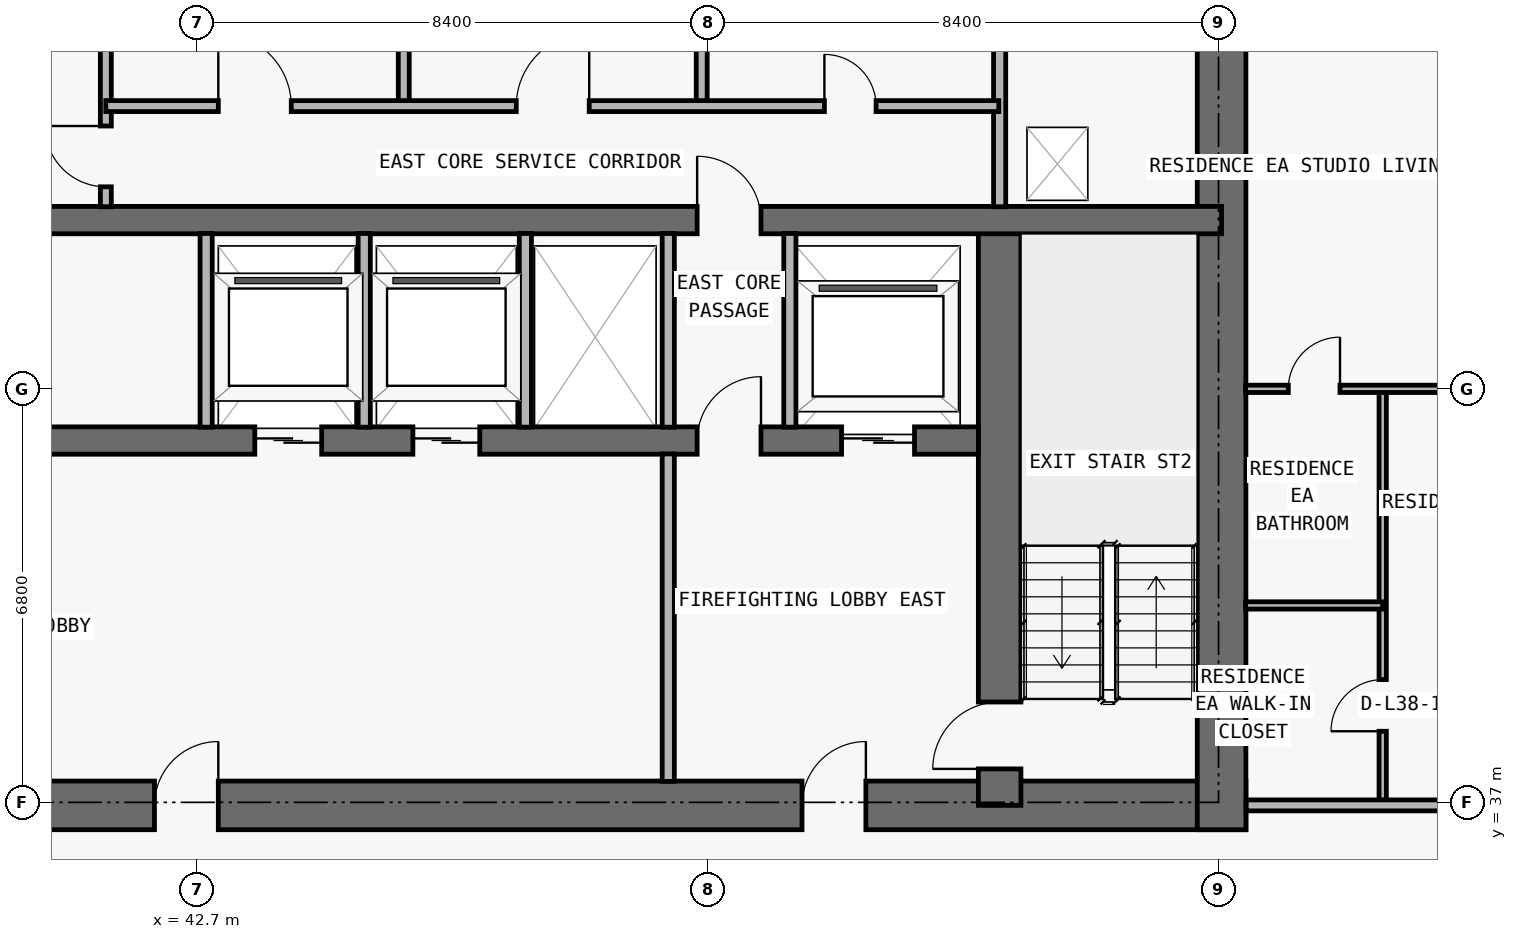
"""IFC4 building model, lengths in metres.
Left out: names, types, materials, properties, quantities, classifications, styles, units other than length and angle.
Written with IfcOpenShell. Run it as: python <this file> out.ifc"""

import sys

from ifc_helpers import new_model, si_unit, direction, frame, frame_2d, origin, place, context, subcontext, project, spatial, rectangle, extrude, element, fill, save


model = new_model("IFC4")
c1 = context("Model", 3, precision=1e-05, world=origin(), true_north=direction((0.0, 1.0)))
c2 = subcontext(c1, "Body", "Model", "MODEL_VIEW")
j1 = project(units=[si_unit("LENGTHUNIT", "METRE"), si_unit("PLANEANGLEUNIT", "RADIAN")], contexts=[c1])
p1 = place(None, origin())
s1 = spatial("IfcSite", under=j1, at=p1, CompositionType="ELEMENT")
p2 = place(p1, origin())
s2 = spatial("IfcBuilding", under=s1, at=p2, CompositionType="ELEMENT")
p3 = place(p2, frame((0.0, 0.0, 138.9)))
s3 = spatial("IfcBuildingStorey", under=s2, at=p3, CompositionType="ELEMENT", Elevation=138.9)
p4 = place(p3, frame((17.85, 36.95, 0.0), z_axis=(0.0, 0.0, 1.0), x_axis=(1.0, 0.0, 0.0)))
e1 = element("IfcWall", 1, at=p4, inside=s3, PredefinedType="SHEAR", context=c2, shape_type="SweptSolid", body=[
    extrude(rectangle(XDim=42.1, YDim=0.8, at=frame_2d((21.05, 0.0))), origin(), (0.0, 0.0, 1.0), 3.05),
])
p5 = place(p4, frame((14.45, 0.0, 0.0)))
e2 = element("IfcOpeningElement", 2, at=p5, cuts=e1, PredefinedType="OPENING", context=c2, shape_type="SweptSolid", body=[
    extrude(rectangle(XDim=1.1, YDim=2.15, at=frame_2d((0.55, 1.075))), frame((0.0, 0.41, 0.0), z_axis=(0.0, -1.0, 0.0), x_axis=(1.0, 0.0, 0.0)), (0.0, 0.0, 1.0), 0.82),
])
p6 = place(p4, frame((6.3, 0.0, 0.0)))
e3 = element("IfcOpeningElement", 3, at=p6, cuts=e1, PredefinedType="OPENING", context=c2, shape_type="SweptSolid", body=[
    extrude(rectangle(XDim=1.05, YDim=2.15, at=frame_2d((0.525, 1.075))), frame((0.0, 0.41, 0.0), z_axis=(0.0, -1.0, 0.0), x_axis=(1.0, 0.0, 0.0)), (0.0, 0.0, 1.0), 0.82),
])
p7 = place(p4, frame((34.8, 0.0, 0.0)))
e4 = element("IfcOpeningElement", 4, at=p7, cuts=e1, PredefinedType="OPENING", context=c2, shape_type="SweptSolid", body=[
    extrude(rectangle(XDim=1.05, YDim=2.15, at=frame_2d((0.525, 1.075))), frame((0.0, 0.41, 0.0), z_axis=(0.0, -1.0, 0.0), x_axis=(1.0, 0.0, 0.0)), (0.0, 0.0, 1.0), 0.82),
])
p8 = place(p4, frame((10.913, 0.0, 0.0)))
e5 = element("IfcOpeningElement", 5, at=p8, cuts=e1, PredefinedType="OPENING", context=c2, shape_type="SweptSolid", body=[
    extrude(rectangle(XDim=1.05, YDim=2.15, at=frame_2d((0.525, 1.075))), frame((0.0, 0.41, 0.0), z_axis=(0.0, -1.0, 0.0), x_axis=(1.0, 0.0, 0.0)), (0.0, 0.0, 1.0), 0.82),
])
p9 = place(p4, frame((24.15, 0.0, 0.0)))
e6 = element("IfcOpeningElement", 6, at=p9, cuts=e1, PredefinedType="OPENING", context=c2, shape_type="SweptSolid", body=[
    extrude(rectangle(XDim=1.05, YDim=2.15, at=frame_2d((0.525, 1.075))), frame((0.0, 0.41, 0.0), z_axis=(0.0, -1.0, 0.0), x_axis=(1.0, 0.0, 0.0)), (0.0, 0.0, 1.0), 0.82),
])
p10 = place(p3, frame((59.55, 36.55, 0.0), z_axis=(0.0, 0.0, 1.0), x_axis=(0.0, 1.0, 0.0)))
e7 = element("IfcWall", 7, at=p10, inside=s3, PredefinedType="SHEAR", context=c2, shape_type="SweptSolid", body=[
    extrude(rectangle(XDim=14.05, YDim=0.8, at=frame_2d((7.025, 0.0))), origin(), (0.0, 0.0, 1.0), 3.05),
])
p11 = place(p3, frame((55.9, 36.95, 0.0), z_axis=(0.0, 0.0, 1.0), x_axis=(0.0, 1.0, 0.0)))
e8 = element("IfcWall", 8, at=p11, inside=s3, PredefinedType="SHEAR", context=c2, shape_type="SweptSolid", body=[
    extrude(rectangle(XDim=9.625, YDim=0.7, at=frame_2d((4.812, 0.0))), origin(), (0.0, 0.0, 1.0), 3.05),
])
p12 = place(p11, frame((0.6, 0.0, 0.0)))
e9 = element("IfcOpeningElement", 9, at=p12, cuts=e8, PredefinedType="OPENING", context=c2, shape_type="SweptSolid", body=[
    extrude(rectangle(XDim=1.1, YDim=2.15, at=frame_2d((0.55, 1.075))), frame((0.0, 0.36, 0.0), z_axis=(0.0, -1.0, 0.0), x_axis=(1.0, 0.0, 0.0)), (0.0, 0.0, 1.0), 0.72),
])
p13 = place(p3, frame((22.25, 42.95, 0.0), z_axis=(0.0, 0.0, 1.0), x_axis=(1.0, 0.0, 0.0)))
e10 = element("IfcWall", 10, at=p13, inside=s3, PredefinedType="SHEAR", context=c2, shape_type="SweptSolid", body=[
    extrude(rectangle(XDim=33.3, YDim=0.45, at=frame_2d((16.65, 0.0))), origin(), (0.0, 0.0, 1.0), 3.05),
])
p14 = place(p13, frame((1.05, 0.0, 0.0)))
e11 = element("IfcOpeningElement", 11, at=p14, cuts=e10, PredefinedType="OPENING", context=c2, shape_type="SweptSolid", body=[
    extrude(rectangle(XDim=1.2, YDim=2.2, at=frame_2d((0.6, 1.1))), frame((0.0, 0.235, 0.0), z_axis=(0.0, -1.0, 0.0), x_axis=(1.0, 0.0, 0.0)), (0.0, 0.0, 1.0), 0.47),
])
p15 = place(p13, frame((31.05, 0.0, 0.0)))
e12 = element("IfcOpeningElement", 12, at=p15, cuts=e10, PredefinedType="OPENING", context=c2, shape_type="SweptSolid", body=[
    extrude(rectangle(XDim=1.2, YDim=2.2, at=frame_2d((0.6, 1.1))), frame((0.0, 0.235, 0.0), z_axis=(0.0, -1.0, 0.0), x_axis=(1.0, 0.0, 0.0)), (0.0, 0.0, 1.0), 0.47),
])
p16 = place(p13, frame((21.4, 0.0, 0.0)))
e13 = element("IfcOpeningElement", 13, at=p16, cuts=e10, PredefinedType="OPENING", context=c2, shape_type="SweptSolid", body=[
    extrude(rectangle(XDim=1.1, YDim=2.2, at=frame_2d((0.55, 1.1))), frame((0.0, 0.235, 0.0), z_axis=(0.0, -1.0, 0.0), x_axis=(1.0, 0.0, 0.0)), (0.0, 0.0, 1.0), 0.47),
])
p17 = place(p13, frame((24.0, 0.0, 0.0)))
e14 = element("IfcOpeningElement", 14, at=p17, cuts=e10, PredefinedType="OPENING", context=c2, shape_type="SweptSolid", body=[
    extrude(rectangle(XDim=1.1, YDim=2.2, at=frame_2d((0.55, 1.1))), frame((0.0, 0.235, 0.0), z_axis=(0.0, -1.0, 0.0), x_axis=(1.0, 0.0, 0.0)), (0.0, 0.0, 1.0), 0.47),
])
p18 = place(p13, frame((3.625, 0.0, 0.0)))
e15 = element("IfcOpeningElement", 15, at=p18, cuts=e10, PredefinedType="OPENING", context=c2, shape_type="SweptSolid", body=[
    extrude(rectangle(XDim=1.05, YDim=2.15, at=frame_2d((0.525, 1.075))), frame((0.0, 0.235, 0.0), z_axis=(0.0, -1.0, 0.0), x_axis=(1.0, 0.0, 0.0)), (0.0, 0.0, 1.0), 0.47),
])
p19 = place(p13, frame((28.675, 0.0, 0.0)))
e16 = element("IfcOpeningElement", 16, at=p19, cuts=e10, PredefinedType="OPENING", context=c2, shape_type="SweptSolid", body=[
    extrude(rectangle(XDim=1.05, YDim=2.15, at=frame_2d((0.525, 1.075))), frame((0.0, 0.235, 0.0), z_axis=(0.0, -1.0, 0.0), x_axis=(1.0, 0.0, 0.0)), (0.0, 0.0, 1.0), 0.47),
])
p20 = place(p13, frame((15.975, 0.0, 0.0)))
e17 = element("IfcOpeningElement", 17, at=p20, cuts=e10, PredefinedType="OPENING", context=c2, shape_type="SweptSolid", body=[
    extrude(rectangle(XDim=1.0, YDim=2.2, at=frame_2d((0.5, 1.1))), frame((0.0, 0.235, 0.0), z_axis=(0.0, -1.0, 0.0), x_axis=(1.0, 0.0, 0.0)), (0.0, 0.0, 1.0), 0.47),
])
p21 = place(p3, frame((18.25, 46.575, 0.0), z_axis=(0.0, 0.0, 1.0), x_axis=(1.0, 0.0, 0.0)))
e18 = element("IfcWall", 18, at=p21, inside=s3, PredefinedType="SHEAR", context=c2, shape_type="SweptSolid", body=[
    extrude(rectangle(XDim=41.3, YDim=0.45, at=frame_2d((20.65, 0.0))), origin(), (0.0, 0.0, 1.0), 3.05),
])
p22 = place(p21, frame((7.65, 0.0, 0.0)))
e19 = element("IfcOpeningElement", 19, at=p22, cuts=e18, PredefinedType="OPENING", context=c2, shape_type="SweptSolid", body=[
    extrude(rectangle(XDim=1.0, YDim=2.2, at=frame_2d((0.5, 1.1))), frame((0.0, 0.235, 0.0), z_axis=(0.0, -1.0, 0.0), x_axis=(1.0, 0.0, 0.0)), (0.0, 0.0, 1.0), 0.47),
])
p23 = place(p21, frame((32.675, 0.0, 0.0)))
e20 = element("IfcOpeningElement", 20, at=p23, cuts=e18, PredefinedType="OPENING", context=c2, shape_type="SweptSolid", body=[
    extrude(rectangle(XDim=1.05, YDim=2.15, at=frame_2d((0.525, 1.075))), frame((0.0, 0.235, 0.0), z_axis=(0.0, -1.0, 0.0), x_axis=(1.0, 0.0, 0.0)), (0.0, 0.0, 1.0), 0.47),
])
p24 = place(p3, frame((41.2, 46.795, 0.0), z_axis=(0.0, 0.0, 1.0), x_axis=(0.0, 1.0, 0.0)))
e21 = element("IfcWall", 21, at=p24, inside=s3, PredefinedType="PARTITIONING", context=c2, shape_type="SweptSolid", body=[
    extrude(rectangle(XDim=3.16, YDim=0.18, at=frame_2d((1.58, 0.0))), origin(), (0.0, 0.0, 1.0), 3.05),
])
p25 = place(p24, frame((0.327, 0.0, 0.0)))
e22 = element("IfcOpeningElement", 22, at=p25, cuts=e21, PredefinedType="OPENING", context=c2, shape_type="SweptSolid", body=[
    extrude(rectangle(XDim=1.0, YDim=2.2, at=frame_2d((0.5, 1.1))), frame((0.0, 0.1, 0.0), z_axis=(0.0, -1.0, 0.0), x_axis=(1.0, 0.0, 0.0)), (0.0, 0.0, 1.0), 0.2),
])
for number, where, z_axis, x_axis in (
    (23, (42.85, 43.17, 0.0), (0.0, 0.0, 1.0), (0.0, 1.0, 0.0)),
    (24, (45.45, 43.17, 0.0), (0.0, 0.0, 1.0), (0.0, 1.0, 0.0)),
):
    element("IfcWall", number, at=place(p3, frame(where, z_axis=z_axis, x_axis=x_axis)), inside=s3, PredefinedType="PARTITIONING", context=c2, shape_type="SweptSolid", body=[
        extrude(rectangle(XDim=3.185, YDim=0.2, at=frame_2d((1.593, 0.0))), origin(), (0.0, 0.0, 1.0), 3.05),
    ])
p26 = place(p3, frame((46.1, 48.45, 0.0), z_axis=(0.0, 0.0, 1.0), x_axis=(0.0, 1.0, 0.0)))
e25 = element("IfcWall", 25, at=p26, inside=s3, PredefinedType="PARTITIONING", context=c2, shape_type="SweptSolid", body=[
    extrude(rectangle(XDim=1.505, YDim=0.18, at=frame_2d((0.752, 0.0))), origin(), (0.0, 0.0, 1.0), 3.05),
])
p27 = place(p3, frame((48.1, 43.17, 0.0), z_axis=(0.0, 0.0, 1.0), x_axis=(0.0, 1.0, 0.0)))
e26 = element("IfcWall", 26, at=p27, inside=s3, PredefinedType="PARTITIONING", context=c2, shape_type="SweptSolid", body=[
    extrude(rectangle(XDim=3.185, YDim=0.2, at=frame_2d((1.593, 0.0))), origin(), (0.0, 0.0, 1.0), 3.05),
])
p28 = place(p3, frame((50.45, 37.345, 0.0), z_axis=(0.0, 0.0, 1.0), x_axis=(0.0, 1.0, 0.0)))
e27 = element("IfcWall", 27, at=p28, inside=s3, PredefinedType="PARTITIONING", context=c2, shape_type="SweptSolid", body=[
    extrude(rectangle(XDim=5.385, YDim=0.2, at=frame_2d((2.692, 0.0))), origin(), (0.0, 0.0, 1.0), 3.05),
])
p29 = place(p3, frame((50.45, 43.17, 0.0), z_axis=(0.0, 0.0, 1.0), x_axis=(0.0, 1.0, 0.0)))
e28 = element("IfcWall", 28, at=p29, inside=s3, PredefinedType="PARTITIONING", context=c2, shape_type="SweptSolid", body=[
    extrude(rectangle(XDim=3.185, YDim=0.2, at=frame_2d((1.593, 0.0))), origin(), (0.0, 0.0, 1.0), 3.05),
])
p30 = place(p3, frame((51.0, 48.45, 0.0), z_axis=(0.0, 0.0, 1.0), x_axis=(0.0, 1.0, 0.0)))
e29 = element("IfcWall", 29, at=p30, inside=s3, PredefinedType="PARTITIONING", context=c2, shape_type="SweptSolid", body=[
    extrude(rectangle(XDim=1.505, YDim=0.18, at=frame_2d((0.752, 0.0))), origin(), (0.0, 0.0, 1.0), 3.05),
])
p31 = place(p3, frame((52.45, 43.17, 0.0), z_axis=(0.0, 0.0, 1.0), x_axis=(0.0, 1.0, 0.0)))
e30 = element("IfcWall", 30, at=p31, inside=s3, PredefinedType="PARTITIONING", context=c2, shape_type="SweptSolid", body=[
    extrude(rectangle(XDim=3.185, YDim=0.2, at=frame_2d((1.593, 0.0))), origin(), (0.0, 0.0, 1.0), 3.05),
])
p32 = place(p3, frame((55.9, 46.795, 0.0), z_axis=(0.0, 0.0, 1.0), x_axis=(0.0, 1.0, 0.0)))
e31 = element("IfcWall", 31, at=p32, inside=s3, PredefinedType="PARTITIONING", context=c2, shape_type="SweptSolid", body=[
    extrude(rectangle(XDim=3.16, YDim=0.2, at=frame_2d((1.58, 0.0))), origin(), (0.0, 0.0, 1.0), 3.05),
])
p33 = place(p3, frame((62.2, 36.95, 0.0), z_axis=(0.0, 0.0, 1.0), x_axis=(0.0, 1.0, 0.0)))
e32 = element("IfcWall", 32, at=p33, inside=s3, PredefinedType="PARTITIONING", context=c2, shape_type="SweptSolid", body=[
    extrude(rectangle(XDim=6.85, YDim=0.12, at=frame_2d((3.425, 0.0))), origin(), (0.0, 0.0, 1.0), 3.05),
])
p34 = place(p33, frame((1.219, 0.0, 0.0)))
e33 = element("IfcOpeningElement", 33, at=p34, cuts=e32, PredefinedType="OPENING", context=c2, shape_type="SweptSolid", body=[
    extrude(rectangle(XDim=0.85, YDim=2.1, at=frame_2d((0.425, 1.05))), frame((0.0, 0.07, 0.0), z_axis=(0.0, -1.0, 0.0), x_axis=(1.0, 0.0, 0.0)), (0.0, 0.0, 1.0), 0.14),
])
p35 = place(p3, frame((59.955, 36.95, 0.0), z_axis=(0.0, 0.0, 1.0), x_axis=(1.0, 0.0, 0.0)))
e34 = element("IfcWall", 34, at=p35, inside=s3, PredefinedType="PARTITIONING", context=c2, shape_type="SweptSolid", body=[
    extrude(rectangle(XDim=10.145, YDim=0.18, at=frame_2d((5.073, 0.0))), origin(), (0.0, 0.0, 1.0), 3.05),
])
p36 = place(p35, frame((3.957, 0.0, 0.0)))
e35 = element("IfcOpeningElement", 35, at=p36, cuts=e34, PredefinedType="OPENING", context=c2, shape_type="SweptSolid", body=[
    extrude(rectangle(XDim=1.0, YDim=2.2, at=frame_2d((0.5, 1.1))), frame((0.0, 0.1, 0.0), z_axis=(0.0, -1.0, 0.0), x_axis=(1.0, 0.0, 0.0)), (0.0, 0.0, 1.0), 0.2),
])
p37 = place(p3, frame((59.945, 40.238, 0.0), z_axis=(0.0, 0.0, 1.0), x_axis=(1.0, 0.0, 0.0)))
e36 = element("IfcWall", 36, at=p37, inside=s3, PredefinedType="PARTITIONING", context=c2, shape_type="SweptSolid", body=[
    extrude(rectangle(XDim=2.255, YDim=0.12, at=frame_2d((1.127, 0.0))), origin(), (0.0, 0.0, 1.0), 3.05),
])
p38 = place(p3, frame((59.945, 43.8, 0.0), z_axis=(0.0, 0.0, 1.0), x_axis=(1.0, 0.0, 0.0)))
e37 = element("IfcWall", 37, at=p38, inside=s3, PredefinedType="PARTITIONING", context=c2, shape_type="SweptSolid", body=[
    extrude(rectangle(XDim=13.66, YDim=0.12, at=frame_2d((6.83, 0.0))), origin(), (0.0, 0.0, 1.0), 2.339),
])
p39 = place(p38, frame((4.017, 0.0, 0.0)))
e38 = element("IfcOpeningElement", 38, at=p39, cuts=e37, PredefinedType="OPENING", context=c2, shape_type="SweptSolid", body=[
    extrude(rectangle(XDim=0.9, YDim=2.15, at=frame_2d((0.45, 1.075))), frame((0.0, 0.07, 0.0), z_axis=(0.0, -1.0, 0.0), x_axis=(1.0, 0.0, 0.0)), (0.0, 0.0, 1.0), 0.14),
])
p40 = place(p38, frame((0.702, 0.0, 0.0)))
e39 = element("IfcOpeningElement", 39, at=p40, cuts=e37, PredefinedType="OPENING", context=c2, shape_type="SweptSolid", body=[
    extrude(rectangle(XDim=0.85, YDim=2.1, at=frame_2d((0.425, 1.05))), frame((0.0, 0.07, 0.0), z_axis=(0.0, -1.0, 0.0), x_axis=(1.0, 0.0, 0.0)), (0.0, 0.0, 1.0), 0.14),
])
p41 = place(p3, frame((41.2, 48.45, 0.0), z_axis=(0.0, 0.0, 1.0), x_axis=(1.0, 0.0, 0.0)))
e40 = element("IfcWall", 40, at=p41, inside=s3, PredefinedType="PARTITIONING", context=c2, shape_type="SweptSolid", body=[
    extrude(rectangle(XDim=14.686, YDim=0.18, at=frame_2d((7.343, 0.0))), origin(), (0.0, 0.0, 1.0), 3.05),
])
p42 = place(p41, frame((1.85, 0.0, 0.0)))
e41 = element("IfcOpeningElement", 41, at=p42, cuts=e40, PredefinedType="OPENING", context=c2, shape_type="SweptSolid", body=[
    extrude(rectangle(XDim=1.2, YDim=2.2, at=frame_2d((0.6, 1.1))), frame((0.0, 0.1, 0.0), z_axis=(0.0, -1.0, 0.0), x_axis=(1.0, 0.0, 0.0)), (0.0, 0.0, 1.0), 0.2),
])
p43 = place(p41, frame((6.75, 0.0, 0.0)))
e42 = element("IfcOpeningElement", 42, at=p43, cuts=e40, PredefinedType="OPENING", context=c2, shape_type="SweptSolid", body=[
    extrude(rectangle(XDim=1.2, YDim=2.2, at=frame_2d((0.6, 1.1))), frame((0.0, 0.1, 0.0), z_axis=(0.0, -1.0, 0.0), x_axis=(1.0, 0.0, 0.0)), (0.0, 0.0, 1.0), 0.2),
])
p44 = place(p41, frame((11.818, 0.0, 0.0)))
e43 = element("IfcOpeningElement", 43, at=p44, cuts=e40, PredefinedType="OPENING", context=c2, shape_type="SweptSolid", body=[
    extrude(rectangle(XDim=0.85, YDim=2.1, at=frame_2d((0.425, 1.05))), frame((0.0, 0.1, 0.0), z_axis=(0.0, -1.0, 0.0), x_axis=(1.0, 0.0, 0.0)), (0.0, 0.0, 1.0), 0.2),
])
p45 = place(p15, origin())
e44 = element("IfcDoor", 44, at=p45, inside=s3, OperationType="DOUBLE_DOOR_SLIDING", PredefinedType="DOOR", context=c2, shape_type="SweptSolid", body=[
    extrude(rectangle(XDim=1.2, YDim=2.2, at=frame_2d((0.6, 1.1))), frame((0.0, 0.025, 0.0), z_axis=(0.0, -1.0, 0.0), x_axis=(1.0, 0.0, 0.0)), (0.0, 0.0, 1.0), 0.05),
])
fill(e12, e44)
p46 = place(p16, origin())
e45 = element("IfcDoor", 45, at=p46, inside=s3, OperationType="DOUBLE_DOOR_SLIDING", PredefinedType="DOOR", context=c2, shape_type="SweptSolid", body=[
    extrude(rectangle(XDim=1.1, YDim=2.2, at=frame_2d((0.55, 1.1))), frame((0.0, 0.025, 0.0), z_axis=(0.0, -1.0, 0.0), x_axis=(1.0, 0.0, 0.0)), (0.0, 0.0, 1.0), 0.05),
])
fill(e13, e45)
p47 = place(p17, origin())
e46 = element("IfcDoor", 46, at=p47, inside=s3, OperationType="DOUBLE_DOOR_SLIDING", PredefinedType="DOOR", context=c2, shape_type="SweptSolid", body=[
    extrude(rectangle(XDim=1.1, YDim=2.2, at=frame_2d((0.55, 1.1))), frame((0.0, 0.025, 0.0), z_axis=(0.0, -1.0, 0.0), x_axis=(1.0, 0.0, 0.0)), (0.0, 0.0, 1.0), 0.05),
])
fill(e14, e46)
p48 = place(p7, origin())
e47 = element("IfcDoor", 47, at=p48, inside=s3, OperationType="SINGLE_SWING_RIGHT", PredefinedType="DOOR", context=c2, shape_type="SweptSolid", body=[
    extrude(rectangle(XDim=1.05, YDim=2.15, at=frame_2d((0.525, 1.075))), frame((0.0, 0.025, 0.0), z_axis=(0.0, -1.0, 0.0), x_axis=(1.0, 0.0, 0.0)), (0.0, 0.0, 1.0), 0.05),
])
fill(e4, e47)
p49 = place(p12, origin())
e48 = element("IfcDoor", 48, at=p49, inside=s3, OperationType="SINGLE_SWING_LEFT", PredefinedType="DOOR", context=c2, shape_type="SweptSolid", body=[
    extrude(rectangle(XDim=1.1, YDim=2.15, at=frame_2d((0.55, 1.075))), frame((0.0, 0.025, 0.0), z_axis=(0.0, -1.0, 0.0), x_axis=(1.0, 0.0, 0.0)), (0.0, 0.0, 1.0), 0.05),
])
fill(e9, e48)
p50 = place(p19, origin())
e49 = element("IfcDoor", 49, at=p50, inside=s3, OperationType="SINGLE_SWING_RIGHT", PredefinedType="DOOR", context=c2, shape_type="SweptSolid", body=[
    extrude(rectangle(XDim=1.05, YDim=2.15, at=frame_2d((0.525, 1.075))), frame((0.0, 0.025, 0.0), z_axis=(0.0, -1.0, 0.0), x_axis=(1.0, 0.0, 0.0)), (0.0, 0.0, 1.0), 0.05),
])
fill(e16, e49)
p51 = place(p9, origin())
e50 = element("IfcDoor", 50, at=p51, inside=s3, OperationType="SINGLE_SWING_RIGHT", PredefinedType="DOOR", context=c2, shape_type="SweptSolid", body=[
    extrude(rectangle(XDim=1.05, YDim=2.15, at=frame_2d((0.525, 1.075))), frame((0.0, 0.025, 0.0), z_axis=(0.0, -1.0, 0.0), x_axis=(1.0, 0.0, 0.0)), (0.0, 0.0, 1.0), 0.05),
])
fill(e6, e50)
p52 = place(p23, origin())
e51 = element("IfcDoor", 51, at=p52, inside=s3, OperationType="SINGLE_SWING_LEFT", PredefinedType="DOOR", context=c2, shape_type="SweptSolid", body=[
    extrude(rectangle(XDim=1.05, YDim=2.15, at=frame_2d((0.525, 1.075))), frame((0.0, 0.025, 0.0), z_axis=(0.0, -1.0, 0.0), x_axis=(1.0, 0.0, 0.0)), (0.0, 0.0, 1.0), 0.05),
])
fill(e20, e51)
p53 = place(p25, origin())
e52 = element("IfcDoor", 52, at=p53, inside=s3, OperationType="SINGLE_SWING_RIGHT", PredefinedType="DOOR", context=c2, shape_type="SweptSolid", body=[
    extrude(rectangle(XDim=1.0, YDim=2.2, at=frame_2d((0.5, 1.1))), frame((0.0, 0.025, 0.0), z_axis=(0.0, -1.0, 0.0), x_axis=(1.0, 0.0, 0.0)), (0.0, 0.0, 1.0), 0.05),
])
fill(e22, e52)
p54 = place(p42, origin())
e53 = element("IfcDoor", 53, at=p54, inside=s3, OperationType="SINGLE_SWING_LEFT", PredefinedType="DOOR", context=c2, shape_type="SweptSolid", body=[
    extrude(rectangle(XDim=1.2, YDim=2.2, at=frame_2d((0.6, 1.1))), frame((0.0, 0.025, 0.0), z_axis=(0.0, -1.0, 0.0), x_axis=(1.0, 0.0, 0.0)), (0.0, 0.0, 1.0), 0.05),
])
fill(e41, e53)
p55 = place(p43, origin())
e54 = element("IfcDoor", 54, at=p55, inside=s3, OperationType="SINGLE_SWING_RIGHT", PredefinedType="DOOR", context=c2, shape_type="SweptSolid", body=[
    extrude(rectangle(XDim=1.2, YDim=2.2, at=frame_2d((0.6, 1.1))), frame((0.0, 0.025, 0.0), z_axis=(0.0, -1.0, 0.0), x_axis=(1.0, 0.0, 0.0)), (0.0, 0.0, 1.0), 0.05),
])
fill(e42, e54)
p56 = place(p44, origin())
e55 = element("IfcDoor", 55, at=p56, inside=s3, OperationType="SINGLE_SWING_LEFT", PredefinedType="DOOR", context=c2, shape_type="SweptSolid", body=[
    extrude(rectangle(XDim=0.85, YDim=2.1, at=frame_2d((0.425, 1.05))), frame((0.0, 0.025, 0.0), z_axis=(0.0, -1.0, 0.0), x_axis=(1.0, 0.0, 0.0)), (0.0, 0.0, 1.0), 0.05),
])
fill(e43, e55)
p57 = place(p34, origin())
e56 = element("IfcDoor", 56, at=p57, inside=s3, OperationType="SINGLE_SWING_LEFT", PredefinedType="DOOR", context=c2, shape_type="SweptSolid", body=[
    extrude(rectangle(XDim=0.85, YDim=2.1, at=frame_2d((0.425, 1.05))), frame((0.0, 0.025, 0.0), z_axis=(0.0, -1.0, 0.0), x_axis=(1.0, 0.0, 0.0)), (0.0, 0.0, 1.0), 0.05),
])
fill(e33, e56)
p58 = place(p40, origin())
e57 = element("IfcDoor", 57, at=p58, inside=s3, OperationType="SINGLE_SWING_RIGHT", PredefinedType="DOOR", context=c2, shape_type="SweptSolid", body=[
    extrude(rectangle(XDim=0.85, YDim=2.1, at=frame_2d((0.425, 1.05))), frame((0.0, 0.025, 0.0), z_axis=(0.0, -1.0, 0.0), x_axis=(1.0, 0.0, 0.0)), (0.0, 0.0, 1.0), 0.05),
])
fill(e39, e57)
save(model, sys.argv[1])
